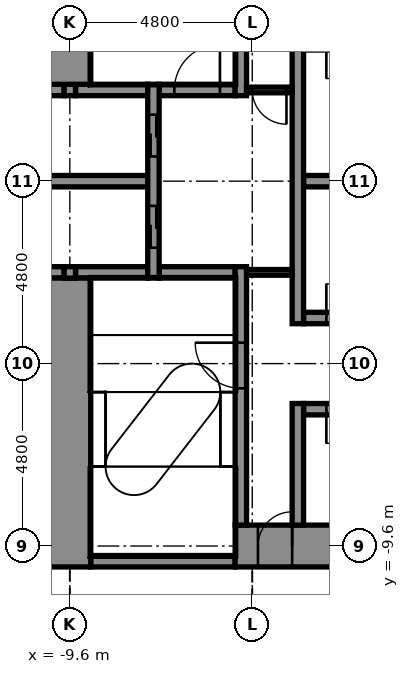
"""IFC4 building model, lengths in metres.
Left out: names, types, materials, properties, quantities, classifications, styles, units other than length and angle.
Written with IfcOpenShell. Run it as: python <this file> out.ifc"""

import sys

from ifc_helpers import new_model, si_unit, direction, frame, frame_2d, origin, place, context, subcontext, project, spatial, rectangle, extrude, element, fill, save


model = new_model("IFC4")
c1 = context("Model", 3, precision=1e-05, world=origin(), true_north=direction((0.0, 1.0)))
c2 = subcontext(c1, "Body", "Model", "MODEL_VIEW")
j1 = project(units=[si_unit("LENGTHUNIT", "METRE"), si_unit("PLANEANGLEUNIT", "RADIAN")], contexts=[c1])
p1 = place(None, origin())
s1 = spatial("IfcSite", under=j1, at=p1, CompositionType="ELEMENT")
p2 = place(p1, origin())
s2 = spatial("IfcBuilding", under=s1, at=p2, CompositionType="ELEMENT")
p3 = place(p2, frame((0.0, 0.0, 38.9)))
s3 = spatial("IfcBuildingStorey", under=s2, at=p3, CompositionType="ELEMENT", Elevation=38.9)
p4 = place(p3, frame((-9.05, -10.0, -0.25), z_axis=(0.0, 0.0, 1.0), x_axis=(1.0, 0.0, 0.0)))
e1 = element("IfcWall", 1, at=p4, inside=s3, PredefinedType="STANDARD", context=c2, shape_type="SweptSolid", body=[
    extrude(rectangle(XDim=3.8, YDim=0.3, at=frame_2d((1.9, 0.0))), origin(), (0.0, 0.0, 1.0), 5.5),
])
p5 = place(p3, frame((-5.25, -9.6, -0.25), z_axis=(0.0, 0.0, 1.0), x_axis=(1.0, 0.0, 0.0)))
e2 = element("IfcWall", 2, at=p5, inside=s3, PredefinedType="SHEAR", context=c2, shape_type="SweptSolid", body=[
    extrude(rectangle(XDim=10.2, YDim=1.1, at=frame_2d((5.1, 0.0))), origin(), (0.0, 0.0, 1.0), 5.5),
])
p6 = place(p5, frame((0.6, 0.0, 0.25)))
e3 = element("IfcOpeningElement", 3, at=p6, cuts=e2, PredefinedType="OPENING", context=c2, shape_type="SweptSolid", body=[
    extrude(rectangle(XDim=0.9, YDim=2.1, at=frame_2d((0.45, 1.05))), frame((0.0, 0.56, 0.0), z_axis=(0.0, -1.0, 0.0), x_axis=(1.0, 0.0, 0.0)), (0.0, 0.0, 1.0), 1.12),
])
p7 = place(p3, frame((-3.45, -6.0, -0.25), z_axis=(0.0, 0.0, 1.0), x_axis=(1.0, 0.0, 0.0)))
e4 = element("IfcWall", 4, at=p7, inside=s3, PredefinedType="STANDARD", context=c2, shape_type="SweptSolid", body=[
    extrude(rectangle(XDim=2.1, YDim=0.3, at=frame_2d((1.05, 0.0))), origin(), (0.0, 0.0, 1.0), 5.5),
])
p8 = place(p7, frame((0.6, 0.0, 0.25)))
e5 = element("IfcOpeningElement", 5, at=p8, cuts=e4, PredefinedType="OPENING", context=c2, shape_type="SweptSolid", body=[
    extrude(rectangle(XDim=0.9, YDim=2.1, at=frame_2d((0.45, 1.05))), frame((0.0, 0.16, 0.0), z_axis=(0.0, -1.0, 0.0), x_axis=(1.0, 0.0, 0.0)), (0.0, 0.0, 1.0), 0.32),
])
p9 = place(p3, frame((-3.45, -3.6, -0.25), z_axis=(0.0, 0.0, 1.0), x_axis=(1.0, 0.0, 0.0)))
e6 = element("IfcWall", 6, at=p9, inside=s3, PredefinedType="STANDARD", context=c2, shape_type="SweptSolid", body=[
    extrude(rectangle(XDim=2.1, YDim=0.3, at=frame_2d((1.05, 0.0))), origin(), (0.0, 0.0, 1.0), 5.5),
])
p10 = place(p9, frame((0.6, 0.0, 0.25)))
e7 = element("IfcOpeningElement", 7, at=p10, cuts=e6, PredefinedType="OPENING", context=c2, shape_type="SweptSolid", body=[
    extrude(rectangle(XDim=0.9, YDim=2.1, at=frame_2d((0.45, 1.05))), frame((0.0, 0.16, 0.0), z_axis=(0.0, -1.0, 0.0), x_axis=(1.0, 0.0, 0.0)), (0.0, 0.0, 1.0), 0.32),
])
p11 = place(p3, frame((-10.85, -2.4, -0.25), z_axis=(0.0, 0.0, 1.0), x_axis=(1.0, 0.0, 0.0)))
e8 = element("IfcWall", 8, at=p11, inside=s3, PredefinedType="STANDARD", context=c2, shape_type="SweptSolid", body=[
    extrude(rectangle(XDim=1.1, YDim=0.3, at=frame_2d((0.55, 0.0))), origin(), (0.0, 0.0, 1.0), 5.5),
])
p12 = place(p3, frame((-9.45, -2.4, -0.25), z_axis=(0.0, 0.0, 1.0), x_axis=(1.0, 0.0, 0.0)))
e9 = element("IfcWall", 9, at=p12, inside=s3, PredefinedType="STANDARD", context=c2, shape_type="SweptSolid", body=[
    extrude(rectangle(XDim=1.9, YDim=0.3, at=frame_2d((0.95, 0.0))), origin(), (0.0, 0.0, 1.0), 5.5),
])
p13 = place(p3, frame((-7.25, -2.4, -0.25), z_axis=(0.0, 0.0, 1.0), x_axis=(1.0, 0.0, 0.0)))
e10 = element("IfcWall", 10, at=p13, inside=s3, PredefinedType="STANDARD", context=c2, shape_type="SweptSolid", body=[
    extrude(rectangle(XDim=2.0, YDim=0.3, at=frame_2d((1.0, 0.0))), origin(), (0.0, 0.0, 1.0), 5.5),
])
p14 = place(p3, frame((-10.85, 0.0, -0.25), z_axis=(0.0, 0.0, 1.0), x_axis=(1.0, 0.0, 0.0)))
e11 = element("IfcWall", 11, at=p14, inside=s3, PredefinedType="STANDARD", context=c2, shape_type="SweptSolid", body=[
    extrude(rectangle(XDim=3.3, YDim=0.3, at=frame_2d((1.65, 0.0))), origin(), (0.0, 0.0, 1.0), 5.5),
])
p15 = place(p3, frame((-3.45, 0.0, -0.25), z_axis=(0.0, 0.0, 1.0), x_axis=(1.0, 0.0, 0.0)))
e12 = element("IfcWall", 12, at=p15, inside=s3, PredefinedType="STANDARD", context=c2, shape_type="SweptSolid", body=[
    extrude(rectangle(XDim=2.1, YDim=0.3, at=frame_2d((1.05, 0.0))), origin(), (0.0, 0.0, 1.0), 5.5),
])
p16 = place(p3, frame((-10.85, 2.4, -0.25), z_axis=(0.0, 0.0, 1.0), x_axis=(1.0, 0.0, 0.0)))
e13 = element("IfcWall", 13, at=p16, inside=s3, PredefinedType="STANDARD", context=c2, shape_type="SweptSolid", body=[
    extrude(rectangle(XDim=1.1, YDim=0.3, at=frame_2d((0.55, 0.0))), origin(), (0.0, 0.0, 1.0), 5.5),
])
p17 = place(p3, frame((-9.45, 2.4, -0.25), z_axis=(0.0, 0.0, 1.0), x_axis=(1.0, 0.0, 0.0)))
e14 = element("IfcWall", 14, at=p17, inside=s3, PredefinedType="STANDARD", context=c2, shape_type="SweptSolid", body=[
    extrude(rectangle(XDim=1.9, YDim=0.3, at=frame_2d((0.95, 0.0))), origin(), (0.0, 0.0, 1.0), 5.5),
])
p18 = place(p3, frame((-7.25, 2.4, -0.25), z_axis=(0.0, 0.0, 1.0), x_axis=(1.0, 0.0, 0.0)))
e15 = element("IfcWall", 15, at=p18, inside=s3, PredefinedType="STANDARD", context=c2, shape_type="SweptSolid", body=[
    extrude(rectangle(XDim=2.0, YDim=0.3, at=frame_2d((1.0, 0.0))), origin(), (0.0, 0.0, 1.0), 5.5),
])
p19 = place(p18, frame((0.4, 0.0, 0.25)))
e16 = element("IfcOpeningElement", 16, at=p19, cuts=e15, PredefinedType="OPENING", context=c2, shape_type="SweptSolid", body=[
    extrude(rectangle(XDim=1.2, YDim=2.1, at=frame_2d((0.6, 1.05))), frame((0.0, 0.16, 0.0), z_axis=(0.0, -1.0, 0.0), x_axis=(1.0, 0.0, 0.0)), (0.0, 0.0, 1.0), 0.32),
])
p20 = place(p3, frame((-9.6, -10.15, -0.25), z_axis=(0.0, 0.0, 1.0), x_axis=(0.0, 1.0, 0.0)))
e17 = element("IfcWall", 17, at=p20, inside=s3, PredefinedType="SHEAR", context=c2, shape_type="SweptSolid", body=[
    extrude(rectangle(XDim=7.6, YDim=1.1, at=frame_2d((3.8, 0.0))), origin(), (0.0, 0.0, 1.0), 5.5),
])
for number, where, z_axis, x_axis in (
    (18, (-9.6, -2.55, -0.25), (0.0, 0.0, 1.0), (0.0, 1.0, 0.0)),
    (19, (-9.6, 2.25, -0.25), (0.0, 0.0, 1.0), (0.0, 1.0, 0.0)),
):
    element("IfcWall", number, at=place(p3, frame(where, z_axis=z_axis, x_axis=x_axis)), inside=s3, PredefinedType="STANDARD", context=c2, shape_type="SweptSolid", body=[
        extrude(rectangle(XDim=0.3, YDim=0.3, at=frame_2d((0.15, 0.0))), origin(), (0.0, 0.0, 1.0), 5.5),
    ])
p21 = place(p3, frame((-9.6, 2.55, -0.25), z_axis=(0.0, 0.0, 1.0), x_axis=(0.0, 1.0, 0.0)))
e20 = element("IfcWall", 20, at=p21, inside=s3, PredefinedType="SHEAR", context=c2, shape_type="SweptSolid", body=[
    extrude(rectangle(XDim=7.6, YDim=1.1, at=frame_2d((3.8, 0.0))), origin(), (0.0, 0.0, 1.0), 5.5),
])
p22 = place(p3, frame((-7.4, -2.55, -0.25), z_axis=(0.0, 0.0, 1.0), x_axis=(0.0, 1.0, 0.0)))
e21 = element("IfcWall", 21, at=p22, inside=s3, PredefinedType="STANDARD", context=c2, shape_type="SweptSolid", body=[
    extrude(rectangle(XDim=5.1, YDim=0.3, at=frame_2d((2.55, 0.0))), origin(), (0.0, 0.0, 1.0), 5.5),
])
p23 = place(p22, frame((0.8, 0.0, 0.25)))
e22 = element("IfcOpeningElement", 22, at=p23, cuts=e21, PredefinedType="OPENING", context=c2, shape_type="SweptSolid", body=[
    extrude(rectangle(XDim=1.1, YDim=2.1, at=frame_2d((0.55, 1.05))), frame((0.0, 0.16, 0.0), z_axis=(0.0, -1.0, 0.0), x_axis=(1.0, 0.0, 0.0)), (0.0, 0.0, 1.0), 0.32),
])
p24 = place(p22, frame((3.2, 0.0, 0.25)))
e23 = element("IfcOpeningElement", 23, at=p24, cuts=e21, PredefinedType="OPENING", context=c2, shape_type="SweptSolid", body=[
    extrude(rectangle(XDim=1.1, YDim=2.1, at=frame_2d((0.55, 1.05))), frame((0.0, 0.16, 0.0), z_axis=(0.0, -1.0, 0.0), x_axis=(1.0, 0.0, 0.0)), (0.0, 0.0, 1.0), 0.32),
])
p25 = place(p3, frame((-5.1, -9.05, -0.25), z_axis=(0.0, 0.0, 1.0), x_axis=(0.0, 1.0, 0.0)))
e24 = element("IfcWall", 24, at=p25, inside=s3, PredefinedType="STANDARD", context=c2, shape_type="SweptSolid", body=[
    extrude(rectangle(XDim=6.8, YDim=0.3, at=frame_2d((3.4, 0.0))), origin(), (0.0, 0.0, 1.0), 5.5),
])
p26 = place(p25, frame((3.6, 0.0, 0.25)))
e25 = element("IfcOpeningElement", 25, at=p26, cuts=e24, PredefinedType="OPENING", context=c2, shape_type="SweptSolid", body=[
    extrude(rectangle(XDim=1.2, YDim=2.1, at=frame_2d((0.6, 1.05))), frame((0.0, 0.16, 0.0), z_axis=(0.0, -1.0, 0.0), x_axis=(1.0, 0.0, 0.0)), (0.0, 0.0, 1.0), 0.32),
])
p27 = place(p3, frame((-5.1, 2.25, -0.25), z_axis=(0.0, 0.0, 1.0), x_axis=(0.0, 1.0, 0.0)))
e26 = element("IfcWall", 26, at=p27, inside=s3, PredefinedType="STANDARD", context=c2, shape_type="SweptSolid", body=[
    extrude(rectangle(XDim=6.8, YDim=0.3, at=frame_2d((3.4, 0.0))), origin(), (0.0, 0.0, 1.0), 5.5),
])
p28 = place(p27, frame((2.0, 0.0, 0.25)))
e27 = element("IfcOpeningElement", 27, at=p28, cuts=e26, PredefinedType="OPENING", context=c2, shape_type="SweptSolid", body=[
    extrude(rectangle(XDim=1.2, YDim=2.1, at=frame_2d((0.6, 1.05))), frame((0.0, 0.16, 0.0), z_axis=(0.0, -1.0, 0.0), x_axis=(1.0, 0.0, 0.0)), (0.0, 0.0, 1.0), 0.32),
])
p29 = place(p3, frame((-3.6, -9.05, -0.25), z_axis=(0.0, 0.0, 1.0), x_axis=(0.0, 1.0, 0.0)))
e28 = element("IfcWall", 28, at=p29, inside=s3, PredefinedType="STANDARD", context=c2, shape_type="SweptSolid", body=[
    extrude(rectangle(XDim=3.2, YDim=0.3, at=frame_2d((1.6, 0.0))), origin(), (0.0, 0.0, 1.0), 5.5),
])
p30 = place(p3, frame((-3.6, -3.75, -0.25), z_axis=(0.0, 0.0, 1.0), x_axis=(0.0, 1.0, 0.0)))
e29 = element("IfcWall", 29, at=p30, inside=s3, PredefinedType="STANDARD", context=c2, shape_type="SweptSolid", body=[
    extrude(rectangle(XDim=7.5, YDim=0.3, at=frame_2d((3.75, 0.0))), origin(), (0.0, 0.0, 1.0), 5.5),
])
p31 = place(p3, frame((-4.95, 2.4, 0.0), z_axis=(0.0, 0.0, 1.0), x_axis=(1.0, 0.0, 0.0)))
e30 = element("IfcWall", 30, at=p31, inside=s3, PredefinedType="PARTITIONING", context=c2, shape_type="SweptSolid", body=[
    extrude(rectangle(XDim=1.2, YDim=0.15, at=frame_2d((0.6, 0.0))), origin(), (0.0, 0.0, 1.0), 5.25),
])
p32 = place(p31, frame((0.15, 0.0, 0.0)))
e31 = element("IfcOpeningElement", 31, at=p32, cuts=e30, PredefinedType="OPENING", context=c2, shape_type="SweptSolid", body=[
    extrude(rectangle(XDim=0.9, YDim=2.1, at=frame_2d((0.45, 1.05))), frame((0.0, 0.085, 0.0), z_axis=(0.0, -1.0, 0.0), x_axis=(1.0, 0.0, 0.0)), (0.0, 0.0, 1.0), 0.17),
])
p33 = place(p3, frame((-4.95, -2.4, 0.0), z_axis=(0.0, 0.0, 1.0), x_axis=(1.0, 0.0, 0.0)))
e32 = element("IfcWall", 32, at=p33, inside=s3, PredefinedType="PARTITIONING", context=c2, shape_type="SweptSolid", body=[
    extrude(rectangle(XDim=1.2, YDim=0.15, at=frame_2d((0.6, 0.0))), origin(), (0.0, 0.0, 1.0), 5.25),
])
p34 = place(p23, origin())
e33 = element("IfcDoor", 33, at=p34, inside=s3, OperationType="DOUBLE_DOOR_SLIDING", PredefinedType="DOOR", context=c2, shape_type="SweptSolid", body=[
    extrude(rectangle(XDim=1.1, YDim=2.1, at=frame_2d((0.55, 1.05))), frame((0.0, 0.025, 0.0), z_axis=(0.0, -1.0, 0.0), x_axis=(1.0, 0.0, 0.0)), (0.0, 0.0, 1.0), 0.05),
])
fill(e22, e33)
p35 = place(p24, origin())
e34 = element("IfcDoor", 34, at=p35, inside=s3, OperationType="DOUBLE_DOOR_SLIDING", PredefinedType="DOOR", context=c2, shape_type="SweptSolid", body=[
    extrude(rectangle(XDim=1.1, YDim=2.1, at=frame_2d((0.55, 1.05))), frame((0.0, 0.025, 0.0), z_axis=(0.0, -1.0, 0.0), x_axis=(1.0, 0.0, 0.0)), (0.0, 0.0, 1.0), 0.05),
])
fill(e23, e34)
p36 = place(p26, origin())
e35 = element("IfcDoor", 35, at=p36, inside=s3, OperationType="SINGLE_SWING_RIGHT", PredefinedType="DOOR", context=c2, shape_type="SweptSolid", body=[
    extrude(rectangle(XDim=1.2, YDim=2.1, at=frame_2d((0.6, 1.05))), frame((0.0, 0.025, 0.0), z_axis=(0.0, -1.0, 0.0), x_axis=(1.0, 0.0, 0.0)), (0.0, 0.0, 1.0), 0.05),
])
fill(e25, e35)
p37 = place(p10, origin())
e36 = element("IfcDoor", 36, at=p37, inside=s3, OperationType="SINGLE_SWING_LEFT", PredefinedType="DOOR", context=c2, shape_type="SweptSolid", body=[
    extrude(rectangle(XDim=0.9, YDim=2.1, at=frame_2d((0.45, 1.05))), frame((0.0, 0.025, 0.0), z_axis=(0.0, -1.0, 0.0), x_axis=(1.0, 0.0, 0.0)), (0.0, 0.0, 1.0), 0.05),
])
fill(e7, e36)
p38 = place(p8, frame((0.9, 0.0, 0.0), z_axis=(0.0, 0.0, 1.0), x_axis=(-1.0, 0.0, 0.0)))
e37 = element("IfcDoor", 37, at=p38, inside=s3, OperationType="SINGLE_SWING_LEFT", PredefinedType="DOOR", context=c2, shape_type="SweptSolid", body=[
    extrude(rectangle(XDim=0.9, YDim=2.1, at=frame_2d((0.45, 1.05))), frame((0.0, 0.025, 0.0), z_axis=(0.0, -1.0, 0.0), x_axis=(1.0, 0.0, 0.0)), (0.0, 0.0, 1.0), 0.05),
])
fill(e5, e37)
p39 = place(p6, origin())
e38 = element("IfcDoor", 38, at=p39, inside=s3, OperationType="SINGLE_SWING_RIGHT", PredefinedType="DOOR", context=c2, shape_type="SweptSolid", body=[
    extrude(rectangle(XDim=0.9, YDim=2.1, at=frame_2d((0.45, 1.05))), frame((0.0, 0.025, 0.0), z_axis=(0.0, -1.0, 0.0), x_axis=(1.0, 0.0, 0.0)), (0.0, 0.0, 1.0), 0.05),
])
fill(e3, e38)
p40 = place(p32, frame((0.9, 0.0, 0.0), z_axis=(0.0, 0.0, 1.0), x_axis=(-1.0, 0.0, 0.0)))
e39 = element("IfcDoor", 39, at=p40, inside=s3, OperationType="SINGLE_SWING_RIGHT", PredefinedType="DOOR", context=c2, shape_type="SweptSolid", body=[
    extrude(rectangle(XDim=0.9, YDim=2.1, at=frame_2d((0.45, 1.05))), frame((0.0, 0.025, 0.0), z_axis=(0.0, -1.0, 0.0), x_axis=(1.0, 0.0, 0.0)), (0.0, 0.0, 1.0), 0.05),
])
fill(e31, e39)
p41 = place(p19, origin())
e40 = element("IfcDoor", 40, at=p41, inside=s3, OperationType="SINGLE_SWING_RIGHT", PredefinedType="DOOR", context=c2, shape_type="SweptSolid", body=[
    extrude(rectangle(XDim=1.2, YDim=2.1, at=frame_2d((0.6, 1.05))), frame((0.0, 0.025, 0.0), z_axis=(0.0, -1.0, 0.0), x_axis=(1.0, 0.0, 0.0)), (0.0, 0.0, 1.0), 0.05),
])
fill(e16, e40)
save(model, sys.argv[1])
